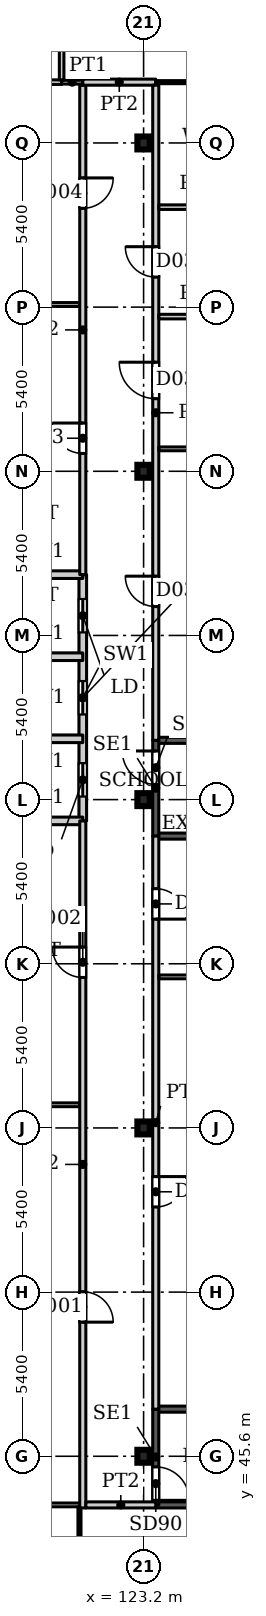
"""IFC4 building model, lengths in metres.
Left out: names, types, materials, properties, quantities, classifications, styles, units other than length and angle.
Written with IfcOpenShell. Run it as: python <this file> out.ifc"""

import sys

from ifc_helpers import new_model, si_unit, direction, frame, frame_2d, origin, origin_2d, place, context, subcontext, project, spatial, rectangle, i_section, extrude, source, transform, mapped, element, fill, save


model = new_model("IFC4")
c1 = context("Model", 3, precision=1e-05, world=origin(), true_north=direction((0.0, 1.0)))
c2 = subcontext(c1, "Body", "Model", "MODEL_VIEW")
j1 = project(units=[si_unit("LENGTHUNIT", "METRE"), si_unit("PLANEANGLEUNIT", "RADIAN")], contexts=[c1])
p1 = place(None, origin())
s1 = spatial("IfcSite", under=j1, at=p1, CompositionType="ELEMENT")
p2 = place(p1, origin())
s2 = spatial("IfcBuilding", under=s1, at=p2, CompositionType="ELEMENT")
p3 = place(p2, frame((0.0, 0.0, 17.0)))
s3 = spatial("IfcBuildingStorey", under=s2, at=p3, CompositionType="ELEMENT", Elevation=17.0)
for number, where, z_axis, x_axis in (
    (1, (123.2, 45.6, 0.0), (0.0, 0.0, 1.0), (1.0, 0.0, 0.0)),
    (2, (123.2, 56.4, 0.0), (0.0, 0.0, 1.0), (1.0, 0.0, 0.0)),
    (3, (123.2, 67.2, 0.0), (0.0, 0.0, 1.0), (1.0, 0.0, 0.0)),
    (4, (123.2, 78.0, 0.0), (0.0, 0.0, 1.0), (1.0, 0.0, 0.0)),
    (5, (123.2, 88.8, 0.0), (0.0, 0.0, 1.0), (1.0, 0.0, 0.0)),
):
    element("IfcColumn", number, at=place(p3, frame(where, z_axis=z_axis, x_axis=x_axis)), inside=s3, PredefinedType="COLUMN", context=c2, shape_type="SweptSolid", body=[
        extrude(i_section(OverallWidth=0.409, OverallDepth=0.425, WebThickness=0.033, FlangeThickness=0.052, FilletRadius=0.013, at=origin_2d()), origin(), (0.0, 0.0, 1.0), 4.5),
    ])
p4 = place(p3, frame((121.2, 66.5, 0.0), z_axis=(0.0, 0.0, 1.0), x_axis=(0.0, 1.0, 0.0)))
e6 = element("IfcWall", 6, at=p4, inside=s3, PredefinedType="PARTITIONING", context=c2, shape_type="SweptSolid", body=[
    extrude(rectangle(XDim=8.1, YDim=0.25, at=frame_2d((4.05, 0.0))), origin(), (0.0, 0.0, 1.0), 4.5),
])
p5 = place(p4, frame((0.8, 0.0, 0.0)))
e7 = element("IfcOpeningElement", 7, at=p5, cuts=e6, PredefinedType="OPENING", context=c2, shape_type="SweptSolid", body=[
    extrude(rectangle(XDim=1.1, YDim=2.2, at=frame_2d((0.55, 1.1))), frame((0.0, 0.135, 0.0), z_axis=(0.0, -1.0, 0.0), x_axis=(1.0, 0.0, 0.0)), (0.0, 0.0, 1.0), 0.27),
])
p6 = place(p4, frame((3.5, 0.0, 0.0)))
e8 = element("IfcOpeningElement", 8, at=p6, cuts=e6, PredefinedType="OPENING", context=c2, shape_type="SweptSolid", body=[
    extrude(rectangle(XDim=1.1, YDim=2.2, at=frame_2d((0.55, 1.1))), frame((0.0, 0.135, 0.0), z_axis=(0.0, -1.0, 0.0), x_axis=(1.0, 0.0, 0.0)), (0.0, 0.0, 1.0), 0.27),
])
p7 = place(p4, frame((6.2, 0.0, 0.0)))
e9 = element("IfcOpeningElement", 9, at=p7, cuts=e6, PredefinedType="OPENING", context=c2, shape_type="SweptSolid", body=[
    extrude(rectangle(XDim=1.1, YDim=2.2, at=frame_2d((0.55, 1.1))), frame((0.0, 0.135, 0.0), z_axis=(0.0, -1.0, 0.0), x_axis=(1.0, 0.0, 0.0)), (0.0, 0.0, 1.0), 0.27),
])
for number, where, z_axis, x_axis in (
    (10, (118.5, 66.5, 0.0), (0.0, 0.0, 1.0), (1.0, 0.0, 0.0)),
    (11, (118.5, 69.2, 0.0), (0.0, 0.0, 1.0), (1.0, 0.0, 0.0)),
    (12, (118.5, 71.9, 0.0), (0.0, 0.0, 1.0), (1.0, 0.0, 0.0)),
    (13, (118.5, 74.6, 0.0), (0.0, 0.0, 1.0), (1.0, 0.0, 0.0)),
):
    element("IfcWall", number, at=place(p3, frame(where, z_axis=z_axis, x_axis=x_axis)), inside=s3, PredefinedType="PARTITIONING", context=c2, shape_type="SweptSolid", body=[
        extrude(rectangle(XDim=2.7, YDim=0.25, at=frame_2d((1.35, 0.0))), origin(), (0.0, 0.0, 1.0), 4.5),
    ])
p8 = place(p3, frame((123.6, 44.0, 0.0), z_axis=(0.0, 0.0, 1.0), x_axis=(1.0, 0.0, 0.0)))
e14 = element("IfcWall", 14, at=p8, inside=s3, PredefinedType="SHEAR", context=c2, shape_type="SweptSolid", body=[
    extrude(rectangle(XDim=7.2, YDim=0.2, at=frame_2d((3.6, 0.0))), origin(), (0.0, 0.0, 1.0), 4.5),
])
p9 = place(p3, frame((123.6, 47.15, 0.0), z_axis=(0.0, 0.0, 1.0), x_axis=(1.0, 0.0, 0.0)))
e15 = element("IfcWall", 15, at=p9, inside=s3, PredefinedType="SHEAR", context=c2, shape_type="SweptSolid", body=[
    extrude(rectangle(XDim=8.4, YDim=0.2, at=frame_2d((4.2, 0.0))), origin(), (0.0, 0.0, 1.0), 4.5),
])
p10 = place(p3, frame((123.6, 44.0, 0.0), z_axis=(0.0, 0.0, 1.0), x_axis=(0.0, 1.0, 0.0)))
e16 = element("IfcWall", 16, at=p10, inside=s3, PredefinedType="SHEAR", context=c2, shape_type="SweptSolid", body=[
    extrude(rectangle(XDim=3.15, YDim=0.2, at=frame_2d((1.575, 0.0))), origin(), (0.0, 0.0, 1.0), 4.5),
])
p11 = place(p10, frame((0.15, 0.0, 0.0)))
e17 = element("IfcOpeningElement", 17, at=p11, cuts=e16, PredefinedType="OPENING", context=c2, shape_type="SweptSolid", body=[
    extrude(rectangle(XDim=1.1, YDim=2.2, at=frame_2d((0.55, 1.1))), frame((0.0, 0.11, 0.0), z_axis=(0.0, -1.0, 0.0), x_axis=(1.0, 0.0, 0.0)), (0.0, 0.0, 1.0), 0.22),
])
p12 = place(p3, frame((123.6, 66.0, 0.0), z_axis=(0.0, 0.0, 1.0), x_axis=(1.0, 0.0, 0.0)))
e18 = element("IfcWall", 18, at=p12, inside=s3, PredefinedType="SHEAR", context=c2, shape_type="SweptSolid", body=[
    extrude(rectangle(XDim=7.2, YDim=0.2, at=frame_2d((3.6, 0.0))), origin(), (0.0, 0.0, 1.0), 4.5),
])
p13 = place(p3, frame((123.6, 69.15, 0.0), z_axis=(0.0, 0.0, 1.0), x_axis=(1.0, 0.0, 0.0)))
e19 = element("IfcWall", 19, at=p13, inside=s3, PredefinedType="SHEAR", context=c2, shape_type="SweptSolid", body=[
    extrude(rectangle(XDim=8.4, YDim=0.2, at=frame_2d((4.2, 0.0))), origin(), (0.0, 0.0, 1.0), 4.5),
])
p14 = place(p3, frame((123.6, 66.0, 0.0), z_axis=(0.0, 0.0, 1.0), x_axis=(0.0, 1.0, 0.0)))
e20 = element("IfcWall", 20, at=p14, inside=s3, PredefinedType="SHEAR", context=c2, shape_type="SweptSolid", body=[
    extrude(rectangle(XDim=3.15, YDim=0.2, at=frame_2d((1.575, 0.0))), origin(), (0.0, 0.0, 1.0), 4.5),
])
p15 = place(p14, frame((1.7, 0.0, 0.0)))
e21 = element("IfcOpeningElement", 21, at=p15, cuts=e20, PredefinedType="OPENING", context=c2, shape_type="SweptSolid", body=[
    extrude(rectangle(XDim=1.1, YDim=2.2, at=frame_2d((0.55, 1.1))), frame((0.0, 0.11, 0.0), z_axis=(0.0, -1.0, 0.0), x_axis=(1.0, 0.0, 0.0)), (0.0, 0.0, 1.0), 0.22),
])
p16 = place(p3, frame((110.183, 90.8, 0.0), z_axis=(0.0, 0.0, 1.0), x_axis=(1.0, 0.0, 0.0)))
e22 = element("IfcWall", 22, at=p16, inside=s3, PredefinedType="PARTITIONING", context=c2, shape_type="SweptSolid", body=[
    extrude(rectangle(XDim=10.321, YDim=0.15, at=frame_2d((5.16, 0.0))), origin(), (0.0, 0.0, 1.0), 4.18),
])
p17 = place(p3, frame((112.862, 44.0, 0.0), z_axis=(0.0, 0.0, 1.0), x_axis=(1.0, 0.0, 0.0)))
e23 = element("IfcWall", 23, at=p17, inside=s3, PredefinedType="PARTITIONING", context=c2, shape_type="SweptSolid", body=[
    extrude(rectangle(XDim=8.279, YDim=0.125, at=frame_2d((4.14, 0.0))), origin(), (0.0, 0.0, 1.0), 4.18),
])
for number, where, z_axis, x_axis in (
    (24, (112.862, 57.162, 0.0), (0.0, 0.0, 1.0), (1.0, 0.0, 0.0)),
    (25, (112.862, 83.487, 0.0), (0.0, 0.0, 1.0), (1.0, 0.0, 0.0)),
):
    element("IfcWall", number, at=place(p3, frame(where, z_axis=z_axis, x_axis=x_axis)), inside=s3, PredefinedType="PARTITIONING", context=c2, shape_type="SweptSolid", body=[
        extrude(rectangle(XDim=8.238, YDim=0.125, at=frame_2d((4.119, 0.0))), origin(), (0.0, 0.0, 1.0), 4.18),
    ])
p18 = place(p3, frame((120.504, 90.8, 0.0), z_axis=(0.0, 0.0, 1.0), x_axis=(1.0, 0.0, 0.0)))
e26 = element("IfcWall", 26, at=p18, inside=s3, PredefinedType="PARTITIONING", context=c2, shape_type="SweptSolid", body=[
    extrude(rectangle(XDim=0.696, YDim=0.125, at=frame_2d((0.348, 0.0))), origin(), (0.0, 0.0, 1.0), 4.18),
])
p19 = place(p3, frame((120.504, 90.875, 0.0), z_axis=(0.0, 0.0, 1.0), x_axis=(0.0, 1.0, 0.0)))
e27 = element("IfcWall", 27, at=p19, inside=s3, PredefinedType="PARTITIONING", context=c2, shape_type="SweptSolid", body=[
    extrude(rectangle(XDim=8.225, YDim=0.15, at=frame_2d((4.113, 0.0))), origin(), (0.0, 0.0, 1.0), 4.18),
])
p20 = place(p3, frame((121.091, 35.3, 0.0), z_axis=(0.0, 0.0, 1.0), x_axis=(0.0, 1.0, 0.0)))
e28 = element("IfcWall", 28, at=p20, inside=s3, PredefinedType="PARTITIONING", context=c2, shape_type="SweptSolid", body=[
    extrude(rectangle(XDim=8.638, YDim=0.1, at=frame_2d((4.319, 0.0))), origin(), (0.0, 0.0, 1.0), 4.18),
])
p21 = place(p3, frame((121.2, 43.9, 0.0), z_axis=(0.0, 0.0, 1.0), x_axis=(0.0, 1.0, 0.0)))
e29 = element("IfcWall", 29, at=p21, inside=s3, PredefinedType="PARTITIONING", context=c2, shape_type="SweptSolid", body=[
    extrude(rectangle(XDim=22.6, YDim=0.2, at=frame_2d((11.3, 0.0))), origin(), (0.0, 0.0, 1.0), 4.18),
])
p22 = place(p21, frame((6.112, 0.0, 0.0)))
e30 = element("IfcOpeningElement", 30, at=p22, cuts=e29, PredefinedType="OPENING", context=c2, shape_type="SweptSolid", body=[
    extrude(rectangle(XDim=1.0, YDim=2.1, at=frame_2d((0.5, 1.05))), frame((0.0, 0.11, 0.0), z_axis=(0.0, -1.0, 0.0), x_axis=(1.0, 0.0, 0.0)), (0.0, 0.0, 1.0), 0.22),
])
p23 = place(p21, frame((17.45, 0.0, 0.0)))
e31 = element("IfcOpeningElement", 31, at=p23, cuts=e29, PredefinedType="OPENING", context=c2, shape_type="SweptSolid", body=[
    extrude(rectangle(XDim=1.0, YDim=2.1, at=frame_2d((0.5, 1.05))), frame((0.0, 0.11, 0.0), z_axis=(0.0, -1.0, 0.0), x_axis=(1.0, 0.0, 0.0)), (0.0, 0.0, 1.0), 0.22),
])
p24 = place(p3, frame((121.2, 74.6, 0.0), z_axis=(0.0, 0.0, 1.0), x_axis=(0.0, 1.0, 0.0)))
e32 = element("IfcWall", 32, at=p24, inside=s3, PredefinedType="PARTITIONING", context=c2, shape_type="SweptSolid", body=[
    extrude(rectangle(XDim=16.1, YDim=0.2, at=frame_2d((8.05, 0.0))), origin(), (0.0, 0.0, 1.0), 4.18),
])
p25 = place(p24, frame((3.987, 0.0, 0.0)))
e33 = element("IfcOpeningElement", 33, at=p25, cuts=e32, PredefinedType="OPENING", context=c2, shape_type="SweptSolid", body=[
    extrude(rectangle(XDim=1.0, YDim=2.1, at=frame_2d((0.5, 1.05))), frame((0.0, 0.11, 0.0), z_axis=(0.0, -1.0, 0.0), x_axis=(1.0, 0.0, 0.0)), (0.0, 0.0, 1.0), 0.22),
])
p26 = place(p24, frame((12.05, 0.0, 0.0)))
e34 = element("IfcOpeningElement", 34, at=p26, cuts=e32, PredefinedType="OPENING", context=c2, shape_type="SweptSolid", body=[
    extrude(rectangle(XDim=1.0, YDim=2.1, at=frame_2d((0.5, 1.05))), frame((0.0, 0.11, 0.0), z_axis=(0.0, -1.0, 0.0), x_axis=(1.0, 0.0, 0.0)), (0.0, 0.0, 1.0), 0.22),
])
p27 = place(p3, frame((121.2, 90.8, 0.0), z_axis=(0.0, 0.0, 1.0), x_axis=(1.0, 0.0, 0.0)))
e35 = element("IfcWall", 35, at=p27, inside=s3, PredefinedType="PARTITIONING", context=c2, shape_type="SweptSolid", body=[
    extrude(rectangle(XDim=2.4, YDim=0.2, at=frame_2d((1.2, 0.0))), origin(), (0.0, 0.0, 1.0), 4.18),
])
p28 = place(p3, frame((121.3, 44.0, 0.0), z_axis=(0.0, 0.0, 1.0), x_axis=(1.0, 0.0, 0.0)))
e36 = element("IfcWall", 36, at=p28, inside=s3, PredefinedType="PARTITIONING", context=c2, shape_type="SweptSolid", body=[
    extrude(rectangle(XDim=2.3, YDim=0.2, at=frame_2d((1.15, 0.0))), origin(), (0.0, 0.0, 1.0), 4.18),
])
p29 = place(p3, frame((123.6, 47.15, 0.0), z_axis=(0.0, 0.0, 1.0), x_axis=(0.0, 1.0, 0.0)))
e37 = element("IfcWall", 37, at=p29, inside=s3, PredefinedType="PARTITIONING", context=c2, shape_type="SweptSolid", body=[
    extrude(rectangle(XDim=18.85, YDim=0.2, at=frame_2d((9.425, 0.0))), origin(), (0.0, 0.0, 1.0), 4.18),
])
p30 = place(p29, frame((6.65, 0.0, 0.0)))
e38 = element("IfcOpeningElement", 38, at=p30, cuts=e37, PredefinedType="OPENING", context=c2, shape_type="SweptSolid", body=[
    extrude(rectangle(XDim=1.0, YDim=2.1, at=frame_2d((0.5, 1.05))), frame((0.0, 0.11, 0.0), z_axis=(0.0, -1.0, 0.0), x_axis=(1.0, 0.0, 0.0)), (0.0, 0.0, 1.0), 0.22),
])
p31 = place(p29, frame((16.119, 0.0, 0.0)))
e39 = element("IfcOpeningElement", 39, at=p31, cuts=e37, PredefinedType="OPENING", context=c2, shape_type="SweptSolid", body=[
    extrude(rectangle(XDim=1.0, YDim=2.1, at=frame_2d((0.5, 1.05))), frame((0.0, 0.11, 0.0), z_axis=(0.0, -1.0, 0.0), x_axis=(1.0, 0.0, 0.0)), (0.0, 0.0, 1.0), 0.22),
])
p32 = place(p3, frame((123.6, 69.15, 0.0), z_axis=(0.0, 0.0, 1.0), x_axis=(0.0, 1.0, 0.0)))
e40 = element("IfcWall", 40, at=p32, inside=s3, PredefinedType="PARTITIONING", context=c2, shape_type="SweptSolid", body=[
    extrude(rectangle(XDim=21.55, YDim=0.2, at=frame_2d((10.775, 0.0))), origin(), (0.0, 0.0, 1.0), 4.18),
])
p33 = place(p32, frame((4.4, 0.0, 0.0)))
e41 = element("IfcOpeningElement", 41, at=p33, cuts=e40, PredefinedType="OPENING", context=c2, shape_type="SweptSolid", body=[
    extrude(rectangle(XDim=1.0, YDim=2.1, at=frame_2d((0.5, 1.05))), frame((0.0, 0.11, 0.0), z_axis=(0.0, -1.0, 0.0), x_axis=(1.0, 0.0, 0.0)), (0.0, 0.0, 1.0), 0.22),
])
p34 = place(p32, frame((15.238, 0.0, 0.0)))
e42 = element("IfcOpeningElement", 42, at=p34, cuts=e40, PredefinedType="OPENING", context=c2, shape_type="SweptSolid", body=[
    extrude(rectangle(XDim=1.0, YDim=2.1, at=frame_2d((0.5, 1.05))), frame((0.0, 0.11, 0.0), z_axis=(0.0, -1.0, 0.0), x_axis=(1.0, 0.0, 0.0)), (0.0, 0.0, 1.0), 0.22),
])
p35 = place(p32, frame((11.238, 0.0, 0.0)))
e43 = element("IfcOpeningElement", 43, at=p35, cuts=e40, PredefinedType="OPENING", context=c2, shape_type="SweptSolid", body=[
    extrude(rectangle(XDim=1.2, YDim=2.1, at=frame_2d((0.6, 1.05))), frame((0.0, 0.11, 0.0), z_axis=(0.0, -1.0, 0.0), x_axis=(1.0, 0.0, 0.0)), (0.0, 0.0, 1.0), 0.22),
])
p36 = place(p3, frame((123.6, 90.8, 0.0), z_axis=(0.0, 0.0, 1.0), x_axis=(1.0, 0.0, 0.0)))
e44 = element("IfcWall", 44, at=p36, inside=s3, PredefinedType="PARTITIONING", context=c2, shape_type="SweptSolid", body=[
    extrude(rectangle(XDim=8.4, YDim=0.1, at=frame_2d((4.2, 0.0))), origin(), (0.0, 0.0, 1.0), 4.18),
])
for number, where, z_axis, x_axis in (
    (45, (123.7, 61.369, 0.0), (0.0, 0.0, 1.0), (1.0, 0.0, 0.0)),
    (46, (123.7, 78.738, 0.0), (0.0, 0.0, 1.0), (1.0, 0.0, 0.0)),
):
    element("IfcWall", number, at=place(p3, frame(where, z_axis=z_axis, x_axis=x_axis)), inside=s3, PredefinedType="PARTITIONING", context=c2, shape_type="SweptSolid", body=[
        extrude(rectangle(XDim=8.3, YDim=0.125, at=frame_2d((4.15, 0.0))), origin(), (0.0, 0.0, 1.0), 4.18),
    ])
for number, where, z_axis, x_axis in (
    (47, (123.7, 83.088, 0.0), (0.0, 0.0, 1.0), (1.0, 0.0, 0.0)),
    (48, (123.7, 86.688, 0.0), (0.0, 0.0, 1.0), (1.0, 0.0, 0.0)),
):
    element("IfcWall", number, at=place(p3, frame(where, z_axis=z_axis, x_axis=x_axis)), inside=s3, PredefinedType="PARTITIONING", context=c2, shape_type="SweptSolid", body=[
        extrude(rectangle(XDim=3.025, YDim=0.15, at=frame_2d((1.513, 0.0))), origin(), (0.0, 0.0, 1.0), 4.18),
    ])
m1 = source(origin(), c2, "Body", "SweptSolid", [
    extrude(rectangle(XDim=1.1, YDim=2.2, at=frame_2d((0.55, 1.1))), frame((0.0, 0.025, 0.0), z_axis=(0.0, -1.0, 0.0), x_axis=(1.0, 0.0, 0.0)), (0.0, 0.0, 1.0), 0.05),
])
p37 = place(p5, origin())
e49 = element("IfcDoor", 49, at=p37, inside=s3, OperationType="SLIDING_TO_LEFT", PredefinedType="DOOR", context=c2, shape_type="MappedRepresentation", body=[
    mapped(m1, transform((0.0, 0.0, 0.0), x_axis=(1.0, 0.0, 0.0), y_axis=(0.0, 1.0, 0.0), z_axis=(0.0, 0.0, 1.0), scale=1.0)),
])
fill(e7, e49)
p38 = place(p6, origin())
e50 = element("IfcDoor", 50, at=p38, inside=s3, OperationType="SLIDING_TO_LEFT", PredefinedType="DOOR", context=c2, shape_type="MappedRepresentation", body=[
    mapped(m1, transform((0.0, 0.0, 0.0), x_axis=(1.0, 0.0, 0.0), y_axis=(0.0, 1.0, 0.0), z_axis=(0.0, 0.0, 1.0), scale=1.0)),
])
fill(e8, e50)
p39 = place(p7, origin())
e51 = element("IfcDoor", 51, at=p39, inside=s3, OperationType="SLIDING_TO_LEFT", PredefinedType="DOOR", context=c2, shape_type="MappedRepresentation", body=[
    mapped(m1, transform((0.0, 0.0, 0.0), x_axis=(1.0, 0.0, 0.0), y_axis=(0.0, 1.0, 0.0), z_axis=(0.0, 0.0, 1.0), scale=1.0)),
])
fill(e9, e51)
m2 = source(origin(), c2, "Body", "SweptSolid", [
    extrude(rectangle(XDim=1.1, YDim=2.2, at=frame_2d((0.55, 1.1))), frame((0.0, 0.025, 0.0), z_axis=(0.0, -1.0, 0.0), x_axis=(1.0, 0.0, 0.0)), (0.0, 0.0, 1.0), 0.05),
])
p40 = place(p11, origin())
e52 = element("IfcDoor", 52, at=p40, inside=s3, OperationType="SINGLE_SWING_RIGHT", PredefinedType="DOOR", context=c2, shape_type="MappedRepresentation", body=[
    mapped(m2, transform((0.0, 0.0, 0.0), x_axis=(1.0, 0.0, 0.0), y_axis=(0.0, 1.0, 0.0), z_axis=(0.0, 0.0, 1.0), scale=1.0)),
])
fill(e17, e52)
p41 = place(p15, origin())
e53 = element("IfcDoor", 53, at=p41, inside=s3, OperationType="SINGLE_SWING_LEFT", PredefinedType="DOOR", context=c2, shape_type="MappedRepresentation", body=[
    mapped(m2, transform((0.0, 0.0, 0.0), x_axis=(1.0, 0.0, 0.0), y_axis=(0.0, 1.0, 0.0), z_axis=(0.0, 0.0, 1.0), scale=1.0)),
])
fill(e21, e53)
m3 = source(origin(), c2, "Body", "SweptSolid", [
    extrude(rectangle(XDim=1.0, YDim=2.1, at=frame_2d((0.5, 1.05))), frame((0.0, 0.025, 0.0), z_axis=(0.0, -1.0, 0.0), x_axis=(1.0, 0.0, 0.0)), (0.0, 0.0, 1.0), 0.05),
])
p42 = place(p22, origin())
e54 = element("IfcDoor", 54, at=p42, inside=s3, OperationType="SINGLE_SWING_RIGHT", PredefinedType="DOOR", context=c2, shape_type="MappedRepresentation", body=[
    mapped(m3, transform((0.0, 0.0, 0.0), x_axis=(1.0, 0.0, 0.0), y_axis=(0.0, 1.0, 0.0), z_axis=(0.0, 0.0, 1.0), scale=1.0)),
])
fill(e30, e54)
p43 = place(p23, origin())
e55 = element("IfcDoor", 55, at=p43, inside=s3, OperationType="SINGLE_SWING_LEFT", PredefinedType="DOOR", context=c2, shape_type="MappedRepresentation", body=[
    mapped(m3, transform((0.0, 0.0, 0.0), x_axis=(1.0, 0.0, 0.0), y_axis=(0.0, 1.0, 0.0), z_axis=(0.0, 0.0, 1.0), scale=1.0)),
])
fill(e31, e55)
p44 = place(p25, origin())
e56 = element("IfcDoor", 56, at=p44, inside=s3, OperationType="SINGLE_SWING_LEFT", PredefinedType="DOOR", context=c2, shape_type="MappedRepresentation", body=[
    mapped(m3, transform((0.0, 0.0, 0.0), x_axis=(1.0, 0.0, 0.0), y_axis=(0.0, 1.0, 0.0), z_axis=(0.0, 0.0, 1.0), scale=1.0)),
])
fill(e33, e56)
p45 = place(p26, origin())
e57 = element("IfcDoor", 57, at=p45, inside=s3, OperationType="SINGLE_SWING_RIGHT", PredefinedType="DOOR", context=c2, shape_type="MappedRepresentation", body=[
    mapped(m3, transform((0.0, 0.0, 0.0), x_axis=(1.0, 0.0, 0.0), y_axis=(0.0, 1.0, 0.0), z_axis=(0.0, 0.0, 1.0), scale=1.0)),
])
fill(e34, e57)
p46 = place(p30, origin())
e58 = element("IfcDoor", 58, at=p46, inside=s3, OperationType="SINGLE_SWING_RIGHT", PredefinedType="DOOR", context=c2, shape_type="MappedRepresentation", body=[
    mapped(m3, transform((0.0, 0.0, 0.0), x_axis=(1.0, 0.0, 0.0), y_axis=(0.0, 1.0, 0.0), z_axis=(0.0, 0.0, 1.0), scale=1.0)),
])
fill(e38, e58)
p47 = place(p31, origin())
e59 = element("IfcDoor", 59, at=p47, inside=s3, OperationType="SINGLE_SWING_RIGHT", PredefinedType="DOOR", context=c2, shape_type="MappedRepresentation", body=[
    mapped(m3, transform((0.0, 0.0, 0.0), x_axis=(1.0, 0.0, 0.0), y_axis=(0.0, 1.0, 0.0), z_axis=(0.0, 0.0, 1.0), scale=1.0)),
])
fill(e39, e59)
p48 = place(p33, origin())
e60 = element("IfcDoor", 60, at=p48, inside=s3, OperationType="SINGLE_SWING_LEFT", PredefinedType="DOOR", context=c2, shape_type="MappedRepresentation", body=[
    mapped(m3, transform((0.0, 0.0, 0.0), x_axis=(1.0, 0.0, 0.0), y_axis=(0.0, 1.0, 0.0), z_axis=(0.0, 0.0, 1.0), scale=1.0)),
])
fill(e41, e60)
p49 = place(p34, origin())
e61 = element("IfcDoor", 61, at=p49, inside=s3, OperationType="SINGLE_SWING_LEFT", PredefinedType="DOOR", context=c2, shape_type="MappedRepresentation", body=[
    mapped(m3, transform((0.0, 0.0, 0.0), x_axis=(1.0, 0.0, 0.0), y_axis=(0.0, 1.0, 0.0), z_axis=(0.0, 0.0, 1.0), scale=1.0)),
])
fill(e42, e61)
m4 = source(origin(), c2, "Body", "SweptSolid", [
    extrude(rectangle(XDim=1.2, YDim=2.1, at=frame_2d((0.6, 1.05))), frame((0.0, 0.025, 0.0), z_axis=(0.0, -1.0, 0.0), x_axis=(1.0, 0.0, 0.0)), (0.0, 0.0, 1.0), 0.05),
])
p50 = place(p35, origin())
e62 = element("IfcDoor", 62, at=p50, inside=s3, OperationType="SINGLE_SWING_LEFT", PredefinedType="DOOR", context=c2, shape_type="MappedRepresentation", body=[
    mapped(m4, transform((0.0, 0.0, 0.0), x_axis=(1.0, 0.0, 0.0), y_axis=(0.0, 1.0, 0.0), z_axis=(0.0, 0.0, 1.0), scale=1.0)),
])
fill(e43, e62)
save(model, sys.argv[1])
